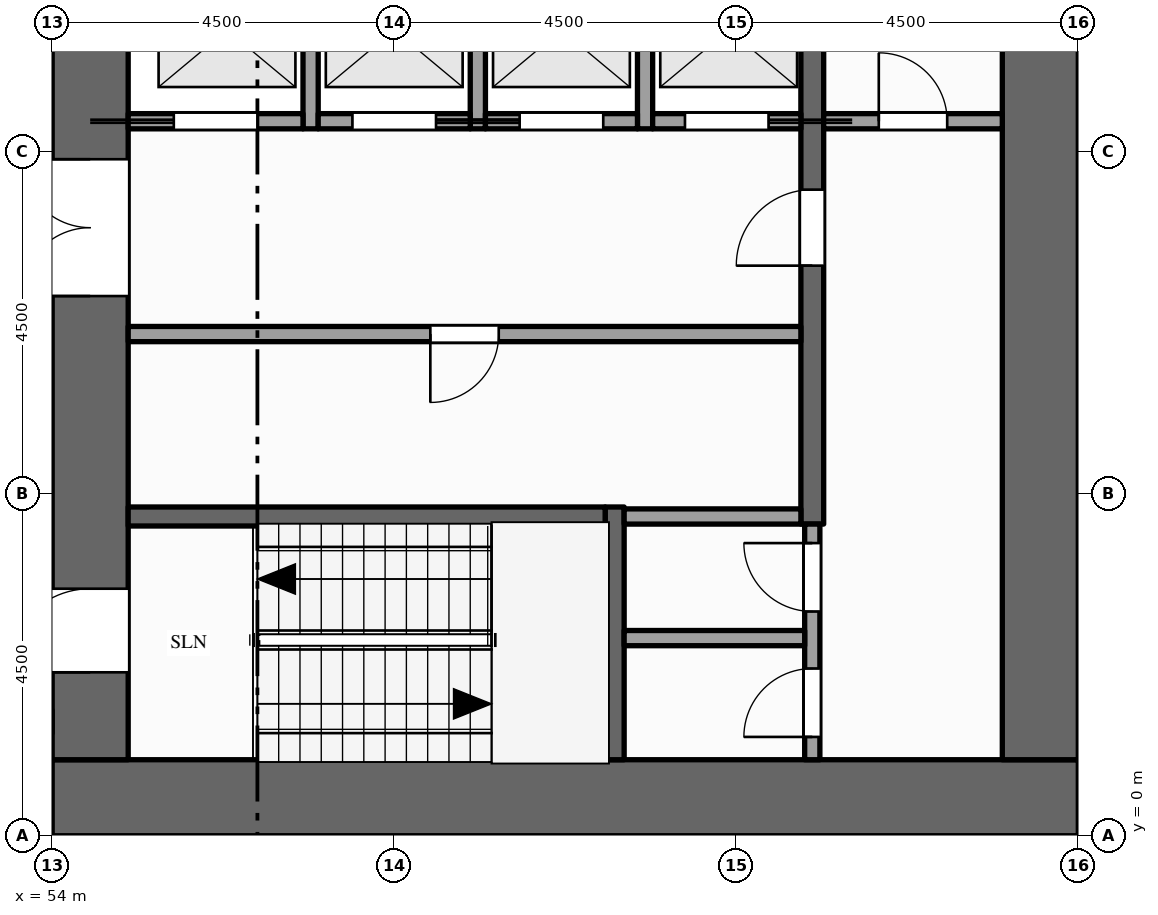
"""IFC4 building model, lengths in metres.
Left out: names, types, materials, properties, quantities, classifications, styles, units other than length and angle.
Written with IfcOpenShell. Run it as: python <this file> out.ifc"""

import sys

from ifc_helpers import new_model, si_unit, direction, frame, frame_2d, origin, place, context, subcontext, project, spatial, rectangle, extrude, element, fill, save


model = new_model("IFC4")
c1 = context("Model", 3, precision=1e-05, world=origin(), true_north=direction((0.0, 1.0)))
c2 = subcontext(c1, "Body", "Model", "MODEL_VIEW")
j1 = project(units=[si_unit("LENGTHUNIT", "METRE"), si_unit("PLANEANGLEUNIT", "RADIAN")], contexts=[c1])
p1 = place(None, origin())
s1 = spatial("IfcSite", under=j1, at=p1, CompositionType="ELEMENT")
p2 = place(p1, origin())
s2 = spatial("IfcBuilding", under=s1, at=p2, CompositionType="ELEMENT")
p3 = place(p2, frame((0.0, 0.0, 179.0)))
s3 = spatial("IfcBuildingStorey", under=s2, at=p3, CompositionType="ELEMENT", Elevation=179.0)
p4 = place(p3, frame((67.5, 0.5, -0.15), z_axis=(0.0, 0.0, 1.0), x_axis=(-1.0, 0.0, 0.0)))
e1 = element("IfcWall", 1, at=p4, inside=s3, PredefinedType="SHEAR", context=c2, shape_type="SweptSolid", body=[
    extrude(rectangle(XDim=13.5, YDim=1.0, at=frame_2d((6.75, 0.0))), origin(), (0.0, 0.0, 1.0), 4.0),
])
p5 = place(p3, frame((54.5, 1.0, -0.15), z_axis=(0.0, 0.0, 1.0), x_axis=(0.0, 1.0, 0.0)))
e2 = element("IfcWall", 2, at=p5, inside=s3, PredefinedType="SHEAR", context=c2, shape_type="SweptSolid", body=[
    extrude(rectangle(XDim=20.5, YDim=1.0, at=frame_2d((10.25, 0.0))), origin(), (0.0, 0.0, 1.0), 4.0),
])
p6 = place(p5, frame((6.1, 0.0, 0.15)))
e3 = element("IfcOpeningElement", 3, at=p6, cuts=e2, PredefinedType="OPENING", context=c2, shape_type="SweptSolid", body=[
    extrude(rectangle(XDim=1.8, YDim=2.1, at=frame_2d((0.9, 1.05))), frame((0.0, 0.51, 0.0), z_axis=(0.0, -1.0, 0.0), x_axis=(1.0, 0.0, 0.0)), (0.0, 0.0, 1.0), 1.02),
])
p7 = place(p5, frame((12.15, 0.0, 0.15)))
e4 = element("IfcOpeningElement", 4, at=p7, cuts=e2, PredefinedType="OPENING", context=c2, shape_type="SweptSolid", body=[
    extrude(rectangle(XDim=1.1, YDim=2.1, at=frame_2d((0.55, 1.05))), frame((0.0, 0.51, 0.0), z_axis=(0.0, -1.0, 0.0), x_axis=(1.0, 0.0, 0.0)), (0.0, 0.0, 1.0), 1.02),
])
p8 = place(p5, frame((1.15, 0.0, 0.15)))
e5 = element("IfcOpeningElement", 5, at=p8, cuts=e2, PredefinedType="OPENING", context=c2, shape_type="SweptSolid", body=[
    extrude(rectangle(XDim=1.1, YDim=2.1, at=frame_2d((0.55, 1.05))), frame((0.0, 0.51, 0.0), z_axis=(0.0, -1.0, 0.0), x_axis=(1.0, 0.0, 0.0)), (0.0, 0.0, 1.0), 1.02),
])
p9 = place(p5, frame((18.35, 0.0, 0.15)))
e6 = element("IfcOpeningElement", 6, at=p9, cuts=e2, PredefinedType="OPENING", context=c2, shape_type="SweptSolid", body=[
    extrude(rectangle(XDim=1.1, YDim=2.1, at=frame_2d((0.55, 1.05))), frame((0.0, 0.51, 0.0), z_axis=(0.0, -1.0, 0.0), x_axis=(1.0, 0.0, 0.0)), (0.0, 0.0, 1.0), 1.02),
])
p10 = place(p3, frame((67.0, 1.0, -0.15), z_axis=(0.0, 0.0, 1.0), x_axis=(0.0, 1.0, 0.0)))
e7 = element("IfcWall", 7, at=p10, inside=s3, PredefinedType="SHEAR", context=c2, shape_type="SweptSolid", body=[
    extrude(rectangle(XDim=20.5, YDim=1.0, at=frame_2d((10.25, 0.0))), origin(), (0.0, 0.0, 1.0), 4.0),
])
for number, where, z_axis, x_axis in (
    (8, (57.4, 9.3, 0.0), (0.0, 0.0, 1.0), (0.0, 1.0, 0.0)),
    (9, (59.6, 9.3, 0.0), (0.0, 0.0, 1.0), (0.0, 1.0, 0.0)),
):
    element("IfcWall", number, at=place(p3, frame(where, z_axis=z_axis, x_axis=x_axis)), inside=s3, PredefinedType="SOLIDWALL", context=c2, shape_type="SweptSolid", body=[
        extrude(rectangle(XDim=2.6, YDim=0.2, at=frame_2d((1.3, 0.0))), origin(), (0.0, 0.0, 1.0), 3.85),
    ])
p11 = place(p3, frame((61.4, 1.0, 0.0), z_axis=(0.0, 0.0, 1.0), x_axis=(0.0, 1.0, 0.0)))
e10 = element("IfcWall", 10, at=p11, inside=s3, PredefinedType="SHEAR", context=c2, shape_type="SweptSolid", body=[
    extrude(rectangle(XDim=3.325, YDim=0.25, at=frame_2d((1.663, 0.0))), origin(), (0.0, 0.0, 1.0), 3.85),
])
p12 = place(p3, frame((61.8, 9.3, 0.0), z_axis=(0.0, 0.0, 1.0), x_axis=(0.0, 1.0, 0.0)))
e11 = element("IfcWall", 11, at=p12, inside=s3, PredefinedType="SOLIDWALL", context=c2, shape_type="SweptSolid", body=[
    extrude(rectangle(XDim=2.6, YDim=0.2, at=frame_2d((1.3, 0.0))), origin(), (0.0, 0.0, 1.0), 3.85),
])
p13 = place(p3, frame((64.0, 1.0, 0.0), z_axis=(0.0, 0.0, 1.0), x_axis=(0.0, 1.0, 0.0)))
e12 = element("IfcWall", 12, at=p13, inside=s3, PredefinedType="PARTITIONING", context=c2, shape_type="SweptSolid", body=[
    extrude(rectangle(XDim=3.1, YDim=0.2, at=frame_2d((1.55, 0.0))), origin(), (0.0, 0.0, 1.0), 3.85),
])
p14 = place(p13, frame((0.3, 0.0, 0.0)))
e13 = element("IfcOpeningElement", 13, at=p14, cuts=e12, PredefinedType="OPENING", context=c2, shape_type="SweptSolid", body=[
    extrude(rectangle(XDim=0.9, YDim=2.1, at=frame_2d((0.45, 1.05))), frame((0.0, 0.11, 0.0), z_axis=(0.0, -1.0, 0.0), x_axis=(1.0, 0.0, 0.0)), (0.0, 0.0, 1.0), 0.22),
])
p15 = place(p13, frame((1.95, 0.0, 0.0)))
e14 = element("IfcOpeningElement", 14, at=p15, cuts=e12, PredefinedType="OPENING", context=c2, shape_type="SweptSolid", body=[
    extrude(rectangle(XDim=0.9, YDim=2.1, at=frame_2d((0.45, 1.05))), frame((0.0, 0.11, 0.0), z_axis=(0.0, -1.0, 0.0), x_axis=(1.0, 0.0, 0.0)), (0.0, 0.0, 1.0), 0.22),
])
p16 = place(p3, frame((64.0, 4.1, 0.0), z_axis=(0.0, 0.0, 1.0), x_axis=(0.0, 1.0, 0.0)))
e15 = element("IfcWall", 15, at=p16, inside=s3, PredefinedType="SHEAR", context=c2, shape_type="SweptSolid", body=[
    extrude(rectangle(XDim=14.5, YDim=0.3, at=frame_2d((7.25, 0.0))), origin(), (0.0, 0.0, 1.0), 3.85),
])
p17 = place(p16, frame((3.4, 0.0, 0.0)))
e16 = element("IfcOpeningElement", 16, at=p17, cuts=e15, PredefinedType="OPENING", context=c2, shape_type="SweptSolid", body=[
    extrude(rectangle(XDim=1.0, YDim=2.1, at=frame_2d((0.5, 1.05))), frame((0.0, 0.16, 0.0), z_axis=(0.0, -1.0, 0.0), x_axis=(1.0, 0.0, 0.0)), (0.0, 0.0, 1.0), 0.32),
])
p18 = place(p16, frame((9.1, 0.0, 0.0)))
e17 = element("IfcOpeningElement", 17, at=p18, cuts=e15, PredefinedType="OPENING", context=c2, shape_type="SweptSolid", body=[
    extrude(rectangle(XDim=1.0, YDim=2.1, at=frame_2d((0.5, 1.05))), frame((0.0, 0.16, 0.0), z_axis=(0.0, -1.0, 0.0), x_axis=(1.0, 0.0, 0.0)), (0.0, 0.0, 1.0), 0.32),
])
p19 = place(p3, frame((61.525, 2.6, 0.0), z_axis=(0.0, 0.0, 1.0), x_axis=(1.0, 0.0, 0.0)))
e18 = element("IfcWall", 18, at=p19, inside=s3, PredefinedType="PARTITIONING", context=c2, shape_type="SweptSolid", body=[
    extrude(rectangle(XDim=2.375, YDim=0.2, at=frame_2d((1.188, 0.0))), origin(), (0.0, 0.0, 1.0), 3.85),
])
p20 = place(p3, frame((55.0, 4.2, 0.0), z_axis=(0.0, 0.0, 1.0), x_axis=(1.0, 0.0, 0.0)))
e19 = element("IfcWall", 19, at=p20, inside=s3, PredefinedType="SHEAR", context=c2, shape_type="SweptSolid", body=[
    extrude(rectangle(XDim=6.275, YDim=0.25, at=frame_2d((3.137, 0.0))), origin(), (0.0, 0.0, 1.0), 3.85),
])
p21 = place(p3, frame((61.525, 4.2, 0.0), z_axis=(0.0, 0.0, 1.0), x_axis=(1.0, 0.0, 0.0)))
e20 = element("IfcWall", 20, at=p21, inside=s3, PredefinedType="PARTITIONING", context=c2, shape_type="SweptSolid", body=[
    extrude(rectangle(XDim=2.325, YDim=0.2, at=frame_2d((1.163, 0.0))), origin(), (0.0, 0.0, 1.0), 3.85),
])
p22 = place(p3, frame((55.0, 6.6, 0.0), z_axis=(0.0, 0.0, 1.0), x_axis=(1.0, 0.0, 0.0)))
e21 = element("IfcWall", 21, at=p22, inside=s3, PredefinedType="PARTITIONING", context=c2, shape_type="SweptSolid", body=[
    extrude(rectangle(XDim=8.85, YDim=0.2, at=frame_2d((4.425, 0.0))), origin(), (0.0, 0.0, 1.0), 3.85),
])
p23 = place(p22, frame((3.975, 0.0, 0.0)))
e22 = element("IfcOpeningElement", 22, at=p23, cuts=e21, PredefinedType="OPENING", context=c2, shape_type="SweptSolid", body=[
    extrude(rectangle(XDim=0.9, YDim=2.1, at=frame_2d((0.45, 1.05))), frame((0.0, 0.11, 0.0), z_axis=(0.0, -1.0, 0.0), x_axis=(1.0, 0.0, 0.0)), (0.0, 0.0, 1.0), 0.22),
])
p24 = place(p3, frame((55.0, 9.4, 0.0), z_axis=(0.0, 0.0, 1.0), x_axis=(1.0, 0.0, 0.0)))
e23 = element("IfcWall", 23, at=p24, inside=s3, PredefinedType="SOLIDWALL", context=c2, shape_type="SweptSolid", body=[
    extrude(rectangle(XDim=2.3, YDim=0.2, at=frame_2d((1.15, 0.0))), origin(), (0.0, 0.0, 1.0), 3.85),
])
p25 = place(p24, frame((0.6, 0.0, 0.012)))
e24 = element("IfcOpeningElement", 24, at=p25, cuts=e23, PredefinedType="OPENING", context=c2, shape_type="SweptSolid", body=[
    extrude(rectangle(XDim=1.1, YDim=2.1, at=frame_2d((0.55, 1.05))), frame((0.0, 0.11, 0.0), z_axis=(0.0, -1.0, 0.0), x_axis=(1.0, 0.0, 0.0)), (0.0, 0.0, 1.0), 0.22),
])
p26 = place(p3, frame((57.5, 9.4, 0.0), z_axis=(0.0, 0.0, 1.0), x_axis=(1.0, 0.0, 0.0)))
e25 = element("IfcWall", 25, at=p26, inside=s3, PredefinedType="SOLIDWALL", context=c2, shape_type="SweptSolid", body=[
    extrude(rectangle(XDim=2.0, YDim=0.2, at=frame_2d((1.0, 0.0))), origin(), (0.0, 0.0, 1.0), 3.85),
])
p27 = place(p26, frame((0.45, 0.0, 0.012)))
e26 = element("IfcOpeningElement", 26, at=p27, cuts=e25, PredefinedType="OPENING", context=c2, shape_type="SweptSolid", body=[
    extrude(rectangle(XDim=1.1, YDim=2.1, at=frame_2d((0.55, 1.05))), frame((0.0, 0.11, 0.0), z_axis=(0.0, -1.0, 0.0), x_axis=(1.0, 0.0, 0.0)), (0.0, 0.0, 1.0), 0.22),
])
p28 = place(p3, frame((59.7, 9.4, 0.0), z_axis=(0.0, 0.0, 1.0), x_axis=(1.0, 0.0, 0.0)))
e27 = element("IfcWall", 27, at=p28, inside=s3, PredefinedType="SOLIDWALL", context=c2, shape_type="SweptSolid", body=[
    extrude(rectangle(XDim=2.0, YDim=0.2, at=frame_2d((1.0, 0.0))), origin(), (0.0, 0.0, 1.0), 3.85),
])
p29 = place(p28, frame((0.45, 0.0, 0.012)))
e28 = element("IfcOpeningElement", 28, at=p29, cuts=e27, PredefinedType="OPENING", context=c2, shape_type="SweptSolid", body=[
    extrude(rectangle(XDim=1.1, YDim=2.1, at=frame_2d((0.55, 1.05))), frame((0.0, 0.11, 0.0), z_axis=(0.0, -1.0, 0.0), x_axis=(1.0, 0.0, 0.0)), (0.0, 0.0, 1.0), 0.22),
])
p30 = place(p3, frame((61.9, 9.4, 0.0), z_axis=(0.0, 0.0, 1.0), x_axis=(1.0, 0.0, 0.0)))
e29 = element("IfcWall", 29, at=p30, inside=s3, PredefinedType="SOLIDWALL", context=c2, shape_type="SweptSolid", body=[
    extrude(rectangle(XDim=1.95, YDim=0.2, at=frame_2d((0.975, 0.0))), origin(), (0.0, 0.0, 1.0), 3.85),
])
p31 = place(p30, frame((0.425, 0.0, 0.012)))
e30 = element("IfcOpeningElement", 30, at=p31, cuts=e29, PredefinedType="OPENING", context=c2, shape_type="SweptSolid", body=[
    extrude(rectangle(XDim=1.1, YDim=2.1, at=frame_2d((0.55, 1.05))), frame((0.0, 0.11, 0.0), z_axis=(0.0, -1.0, 0.0), x_axis=(1.0, 0.0, 0.0)), (0.0, 0.0, 1.0), 0.22),
])
p32 = place(p3, frame((64.15, 9.4, 0.0), z_axis=(0.0, 0.0, 1.0), x_axis=(1.0, 0.0, 0.0)))
e31 = element("IfcWall", 31, at=p32, inside=s3, PredefinedType="PARTITIONING", context=c2, shape_type="SweptSolid", body=[
    extrude(rectangle(XDim=2.35, YDim=0.2, at=frame_2d((1.175, 0.0))), origin(), (0.0, 0.0, 1.0), 3.85),
])
p33 = place(p32, frame((0.725, 0.0, 0.0)))
e32 = element("IfcOpeningElement", 32, at=p33, cuts=e31, PredefinedType="OPENING", context=c2, shape_type="SweptSolid", body=[
    extrude(rectangle(XDim=0.9, YDim=2.1, at=frame_2d((0.45, 1.05))), frame((0.0, 0.11, 0.0), z_axis=(0.0, -1.0, 0.0), x_axis=(1.0, 0.0, 0.0)), (0.0, 0.0, 1.0), 0.22),
])
p34 = place(p25, origin())
e33 = element("IfcDoor", 33, at=p34, inside=s3, OperationType="SLIDING_TO_LEFT", PredefinedType="DOOR", context=c2, shape_type="SweptSolid", body=[
    extrude(rectangle(XDim=1.1, YDim=2.1, at=frame_2d((0.55, 1.05))), frame((0.0, 0.025, 0.0), z_axis=(0.0, -1.0, 0.0), x_axis=(1.0, 0.0, 0.0)), (0.0, 0.0, 1.0), 0.05),
])
fill(e24, e33)
p35 = place(p27, origin())
e34 = element("IfcDoor", 34, at=p35, inside=s3, OperationType="SLIDING_TO_RIGHT", PredefinedType="DOOR", context=c2, shape_type="SweptSolid", body=[
    extrude(rectangle(XDim=1.1, YDim=2.1, at=frame_2d((0.55, 1.05))), frame((0.0, 0.025, 0.0), z_axis=(0.0, -1.0, 0.0), x_axis=(1.0, 0.0, 0.0)), (0.0, 0.0, 1.0), 0.05),
])
fill(e26, e34)
p36 = place(p29, origin())
e35 = element("IfcDoor", 35, at=p36, inside=s3, OperationType="SLIDING_TO_LEFT", PredefinedType="DOOR", context=c2, shape_type="SweptSolid", body=[
    extrude(rectangle(XDim=1.1, YDim=2.1, at=frame_2d((0.55, 1.05))), frame((0.0, 0.025, 0.0), z_axis=(0.0, -1.0, 0.0), x_axis=(1.0, 0.0, 0.0)), (0.0, 0.0, 1.0), 0.05),
])
fill(e28, e35)
p37 = place(p31, origin())
e36 = element("IfcDoor", 36, at=p37, inside=s3, OperationType="SLIDING_TO_RIGHT", PredefinedType="DOOR", context=c2, shape_type="SweptSolid", body=[
    extrude(rectangle(XDim=1.1, YDim=2.1, at=frame_2d((0.55, 1.05))), frame((0.0, 0.025, 0.0), z_axis=(0.0, -1.0, 0.0), x_axis=(1.0, 0.0, 0.0)), (0.0, 0.0, 1.0), 0.05),
])
fill(e30, e36)
p38 = place(p6, origin())
e37 = element("IfcDoor", 37, at=p38, inside=s3, OperationType="DOUBLE_DOOR_SINGLE_SWING", PredefinedType="DOOR", context=c2, shape_type="SweptSolid", body=[
    extrude(rectangle(XDim=1.8, YDim=2.1, at=frame_2d((0.9, 1.05))), frame((0.0, 0.025, 0.0), z_axis=(0.0, -1.0, 0.0), x_axis=(1.0, 0.0, 0.0)), (0.0, 0.0, 1.0), 0.05),
])
fill(e3, e37)
p39 = place(p17, origin())
e38 = element("IfcDoor", 38, at=p39, inside=s3, OperationType="SINGLE_SWING_LEFT", PredefinedType="DOOR", context=c2, shape_type="SweptSolid", body=[
    extrude(rectangle(XDim=1.0, YDim=2.1, at=frame_2d((0.5, 1.05))), frame((0.0, 0.025, 0.0), z_axis=(0.0, -1.0, 0.0), x_axis=(1.0, 0.0, 0.0)), (0.0, 0.0, 1.0), 0.05),
])
fill(e16, e38)
p40 = place(p33, origin())
e39 = element("IfcDoor", 39, at=p40, inside=s3, OperationType="SINGLE_SWING_LEFT", PredefinedType="DOOR", context=c2, shape_type="SweptSolid", body=[
    extrude(rectangle(XDim=0.9, YDim=2.1, at=frame_2d((0.45, 1.05))), frame((0.0, 0.025, 0.0), z_axis=(0.0, -1.0, 0.0), x_axis=(1.0, 0.0, 0.0)), (0.0, 0.0, 1.0), 0.05),
])
fill(e32, e39)
p41 = place(p8, origin())
e40 = element("IfcDoor", 40, at=p41, inside=s3, OperationType="SINGLE_SWING_LEFT", PredefinedType="DOOR", context=c2, shape_type="SweptSolid", body=[
    extrude(rectangle(XDim=1.1, YDim=2.1, at=frame_2d((0.55, 1.05))), frame((0.0, 0.025, 0.0), z_axis=(0.0, -1.0, 0.0), x_axis=(1.0, 0.0, 0.0)), (0.0, 0.0, 1.0), 0.05),
])
fill(e5, e40)
p42 = place(p14, origin())
e41 = element("IfcDoor", 41, at=p42, inside=s3, OperationType="SINGLE_SWING_LEFT", PredefinedType="DOOR", context=c2, shape_type="SweptSolid", body=[
    extrude(rectangle(XDim=0.9, YDim=2.1, at=frame_2d((0.45, 1.05))), frame((0.0, 0.025, 0.0), z_axis=(0.0, -1.0, 0.0), x_axis=(1.0, 0.0, 0.0)), (0.0, 0.0, 1.0), 0.05),
])
fill(e13, e41)
p43 = place(p15, origin())
e42 = element("IfcDoor", 42, at=p43, inside=s3, OperationType="SINGLE_SWING_RIGHT", PredefinedType="DOOR", context=c2, shape_type="SweptSolid", body=[
    extrude(rectangle(XDim=0.9, YDim=2.1, at=frame_2d((0.45, 1.05))), frame((0.0, 0.025, 0.0), z_axis=(0.0, -1.0, 0.0), x_axis=(1.0, 0.0, 0.0)), (0.0, 0.0, 1.0), 0.05),
])
fill(e14, e42)
p44 = place(p23, origin())
e43 = element("IfcDoor", 43, at=p44, inside=s3, OperationType="SINGLE_SWING_LEFT", PredefinedType="DOOR", context=c2, shape_type="SweptSolid", body=[
    extrude(rectangle(XDim=0.9, YDim=2.1, at=frame_2d((0.45, 1.05))), frame((0.0, 0.025, 0.0), z_axis=(0.0, -1.0, 0.0), x_axis=(1.0, 0.0, 0.0)), (0.0, 0.0, 1.0), 0.05),
])
fill(e22, e43)
save(model, sys.argv[1])
